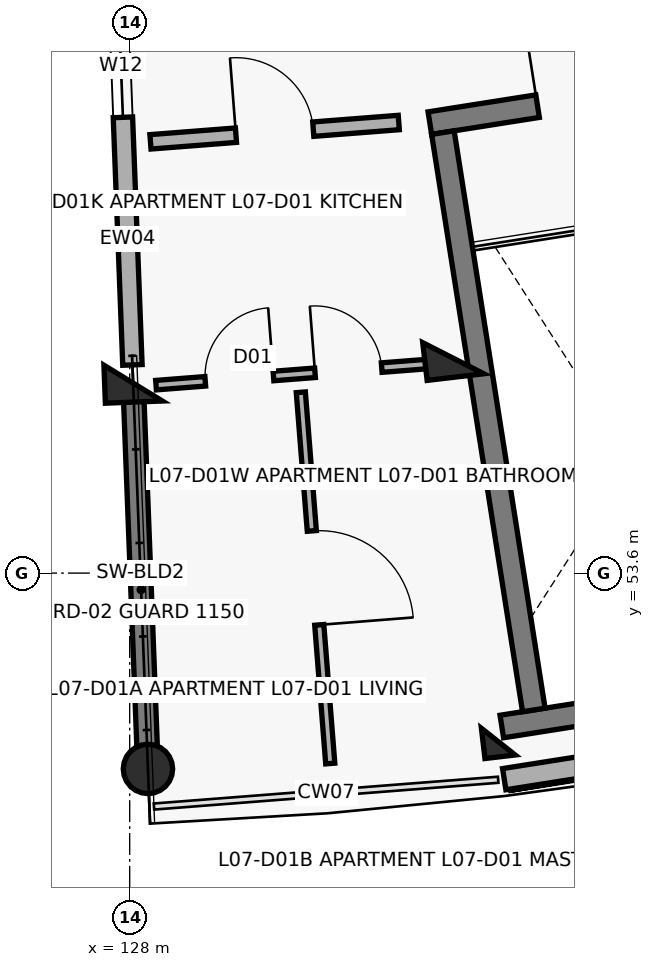
"""IFC4 building model, lengths in metres.
Left out: names, types, materials, properties, quantities, classifications, styles, units other than length and angle.
Written with IfcOpenShell. Run it as: python <this file> out.ifc"""

import sys

from ifc_helpers import new_model, si_unit, direction, frame, frame_2d, origin, origin_2d, place, context, subcontext, project, spatial, rectangle, circle, extrude, element, fill, save


model = new_model("IFC4")
c1 = context("Model", 3, precision=1e-05, world=origin(), true_north=direction((0.0, 1.0)))
c2 = subcontext(c1, "Body", "Model", "MODEL_VIEW")
j1 = project(units=[si_unit("LENGTHUNIT", "METRE"), si_unit("PLANEANGLEUNIT", "RADIAN")], contexts=[c1])
p1 = place(None, origin())
s1 = spatial("IfcSite", under=j1, at=p1, CompositionType="ELEMENT")
p2 = place(p1, origin())
s2 = spatial("IfcBuilding", under=s1, at=p2, CompositionType="ELEMENT")
p3 = place(p2, frame((0.0, 0.0, 23.6)))
s3 = spatial("IfcBuildingStorey", under=s2, at=p3, CompositionType="ELEMENT", Elevation=23.6)
p4 = place(p3, frame((128.045, 56.1, 0.0), z_axis=(0.0, 0.0, 1.0), x_axis=(0.038387809088, -0.999262916411, 0.0)))
e1 = element("IfcColumn", 1, at=p4, inside=s3, PredefinedType="COLUMN", context=c2, shape_type="SweptSolid", body=[
    extrude(rectangle(XDim=0.5, YDim=0.75, at=origin_2d()), origin(), (0.0, 0.0, 1.0), 3.1),
])
p5 = place(p3, frame((128.24, 51.023, 0.0), z_axis=(0.0, 0.0, 1.0), x_axis=(0.038387809088, -0.999262916411, 0.0)))
e2 = element("IfcColumn", 2, at=p5, inside=s3, PredefinedType="COLUMN", context=c2, shape_type="SweptSolid", body=[
    extrude(circle(Radius=0.325, at=origin_2d()), origin(), (0.0, 0.0, 1.0), 3.1),
])
p6 = place(p3, frame((132.257, 56.427, 0.0), z_axis=(0.0, 0.0, 1.0), x_axis=(0.116670737099, -0.993170649538, 0.0)))
e3 = element("IfcColumn", 3, at=p6, inside=s3, PredefinedType="COLUMN", context=c2, shape_type="SweptSolid", body=[
    extrude(rectangle(XDim=0.5, YDim=0.75, at=origin_2d()), origin(), (0.0, 0.0, 1.0), 3.1),
])
p7 = place(p3, frame((132.85, 51.382, 0.0), z_axis=(0.0, 0.0, 1.0), x_axis=(0.116670737099, -0.993170649538, 0.0)))
e4 = element("IfcColumn", 4, at=p7, inside=s3, PredefinedType="COLUMN", context=c2, shape_type="SweptSolid", body=[
    extrude(rectangle(XDim=0.4, YDim=0.4, at=origin_2d()), origin(), (0.0, 0.0, 1.0), 3.1),
])
p8 = place(p3, frame((128.052, 55.92, 0.0), z_axis=(0.0, 0.0, 1.0), x_axis=(0.038381471406, -0.99926315986, 0.0)))
e5 = element("IfcWall", 5, at=p8, inside=s3, PredefinedType="SHEAR", context=c2, shape_type="SweptSolid", body=[
    extrude(rectangle(XDim=4.72, YDim=0.27, at=frame_2d((2.36, 0.0))), origin(), (0.0, 0.0, 1.0), 2.92),
])
p9 = place(p3, frame((132.928, 50.889, 0.0), z_axis=(0.0, 0.0, 1.0), x_axis=(0.987828826394, 0.155544880165, 0.0)))
e6 = element("IfcWall", 6, at=p9, inside=s3, PredefinedType="SOLIDWALL", context=c2, shape_type="SweptSolid", body=[
    extrude(rectangle(XDim=4.622, YDim=0.282, at=frame_2d((2.311, 0.0))), origin(), (0.0, 0.0, 1.0), 2.25),
])
p10 = place(p3, frame((127.829, 61.736, 0.0), z_axis=(0.0, 0.0, 1.0), x_axis=(0.038384504742, -0.999263043345, 0.0)))
e7 = element("IfcWall", 7, at=p10, inside=s3, PredefinedType="SOLIDWALL", context=c2, shape_type="SweptSolid", body=[
    extrude(rectangle(XDim=5.4, YDim=0.255, at=frame_2d((2.7, 0.0))), origin(), (0.0, 0.0, 1.0), 2.24),
])
p11 = place(p10, frame((0.79, 0.0, 0.75)))
e8 = element("IfcOpeningElement", 8, at=p11, cuts=e7, PredefinedType="OPENING", context=c2, shape_type="SweptSolid", body=[
    extrude(rectangle(XDim=1.35, YDim=1.35, at=frame_2d((0.675, 0.675))), frame((0.0, 0.137, 0.0), z_axis=(0.0, -1.0, 0.0), x_axis=(1.0, 0.0, 0.0)), (0.0, 0.0, 1.0), 0.275),
])
p12 = place(p3, frame((131.949, 59.521, 0.0), z_axis=(0.0, 0.0, 1.0), x_axis=(0.98782579805, 0.155564111245, 0.0)))
e9 = element("IfcWall", 9, at=p12, inside=s3, PredefinedType="SHEAR", context=c2, shape_type="SweptSolid", body=[
    extrude(rectangle(XDim=3.87, YDim=0.3, at=frame_2d((1.935, 0.0))), origin(), (0.0, 0.0, 1.0), 3.1),
])
p13 = place(p12, frame((1.435, 0.0, 0.0)))
e10 = element("IfcOpeningElement", 10, at=p13, cuts=e9, PredefinedType="OPENING", context=c2, shape_type="SweptSolid", body=[
    extrude(rectangle(XDim=1.0, YDim=2.15, at=frame_2d((0.5, 1.075))), frame((0.0, 0.16, 0.0), z_axis=(0.0, -1.0, 0.0), x_axis=(1.0, 0.0, 0.0)), (0.0, 0.0, 1.0), 0.32),
])
p14 = place(p3, frame((132.896, 51.581, 0.0), z_axis=(0.0, 0.0, 1.0), x_axis=(0.987819142769, 0.155606366126, 0.0)))
e11 = element("IfcWall", 11, at=p14, inside=s3, PredefinedType="SHEAR", context=c2, shape_type="SweptSolid", body=[
    extrude(rectangle(XDim=4.47, YDim=0.3, at=frame_2d((2.235, 0.0))), origin(), (0.0, 0.0, 1.0), 3.1),
])
p15 = place(p3, frame((132.121, 59.396, 0.0), z_axis=(0.0, 0.0, 1.0), x_axis=(0.155563141844, -0.987825950712, 0.0)))
e12 = element("IfcWall", 12, at=p15, inside=s3, PredefinedType="SHEAR", context=c2, shape_type="SweptSolid", body=[
    extrude(rectangle(XDim=7.69, YDim=0.3, at=frame_2d((3.845, 0.0))), origin(), (0.0, 0.0, 1.0), 3.1),
])
p16 = place(p3, frame((128.273, 59.274, 0.0), z_axis=(0.0, 0.0, 1.0), x_axis=(0.996982624396, 0.077625038827, 0.0)))
e13 = element("IfcWall", 13, at=p16, inside=s3, PredefinedType="SOLIDWALL", context=c2, shape_type="SweptSolid", body=[
    extrude(rectangle(XDim=3.277, YDim=0.19, at=frame_2d((1.639, 0.0))), origin(), (0.0, 0.0, 1.0), 2.14),
])
p17 = place(p16, frame((1.128, 0.0, 0.0)))
e14 = element("IfcOpeningElement", 14, at=p17, cuts=e13, PredefinedType="OPENING", context=c2, shape_type="SweptSolid", body=[
    extrude(rectangle(XDim=1.02, YDim=2.15, at=frame_2d((0.51, 1.075))), frame((0.0, 0.105, 0.0), z_axis=(0.0, -1.0, 0.0), x_axis=(1.0, 0.0, 0.0)), (0.0, 0.0, 1.0), 0.21),
])
p18 = place(p3, frame((128.346, 56.073, 0.0), z_axis=(0.0, 0.0, 1.0), x_axis=(0.996986014478, 0.077581485773, 0.0)))
e15 = element("IfcWall", 15, at=p18, inside=s3, PredefinedType="PARTITIONING", context=c2, shape_type="SweptSolid", body=[
    extrude(rectangle(XDim=3.628, YDim=0.125, at=frame_2d((1.814, 0.0))), origin(), (0.0, 0.0, 1.0), 2.14),
])
p19 = place(p18, frame((0.65, 0.0, 0.0)))
e16 = element("IfcOpeningElement", 16, at=p19, cuts=e15, PredefinedType="OPENING", context=c2, shape_type="SweptSolid", body=[
    extrude(rectangle(XDim=0.9, YDim=2.1, at=frame_2d((0.45, 1.05))), frame((0.0, 0.073, 0.0), z_axis=(0.0, -1.0, 0.0), x_axis=(1.0, 0.0, 0.0)), (0.0, 0.0, 1.0), 0.145),
])
p20 = place(p18, frame((2.098, 0.0, 0.0)))
e17 = element("IfcOpeningElement", 17, at=p20, cuts=e15, PredefinedType="OPENING", context=c2, shape_type="SweptSolid", body=[
    extrude(rectangle(XDim=0.88, YDim=2.1, at=frame_2d((0.44, 1.05))), frame((0.0, 0.073, 0.0), z_axis=(0.0, -1.0, 0.0), x_axis=(1.0, 0.0, 0.0)), (0.0, 0.0, 1.0), 0.145),
])
p21 = place(p3, frame((130.251, 55.979, 0.0), z_axis=(0.0, 0.0, 1.0), x_axis=(0.079073860253, -0.99686875998, 0.0)))
e18 = element("IfcWall", 18, at=p21, inside=s3, PredefinedType="PARTITIONING", context=c2, shape_type="SweptSolid", body=[
    extrude(rectangle(XDim=4.9, YDim=0.12, at=frame_2d((2.45, 0.0))), origin(), (0.0, 0.0, 1.0), 2.14),
])
p22 = place(p21, frame((1.83, 0.0, 0.0)))
e19 = element("IfcOpeningElement", 19, at=p22, cuts=e18, PredefinedType="OPENING", context=c2, shape_type="SweptSolid", body=[
    extrude(rectangle(XDim=1.24, YDim=2.1, at=frame_2d((0.62, 1.05))), frame((0.0, 0.07, 0.0), z_axis=(0.0, -1.0, 0.0), x_axis=(1.0, 0.0, 0.0)), (0.0, 0.0, 1.0), 0.14),
])
p23 = place(p11, origin())
e20 = element("IfcWindow", 20, at=p23, inside=s3, PartitioningType="DOUBLE_PANEL_VERTICAL", PredefinedType="WINDOW", context=c2, shape_type="SweptSolid", body=[
    extrude(rectangle(XDim=1.35, YDim=1.35, at=frame_2d((0.675, 0.675))), frame((0.0, 0.03, 0.0), z_axis=(0.0, -1.0, 0.0), x_axis=(1.0, 0.0, 0.0)), (0.0, 0.0, 1.0), 0.06),
])
fill(e8, e20)
p24 = place(p13, origin())
e21 = element("IfcDoor", 21, at=p24, inside=s3, OperationType="SINGLE_SWING_LEFT", PredefinedType="DOOR", context=c2, shape_type="SweptSolid", body=[
    extrude(rectangle(XDim=1.0, YDim=2.15, at=frame_2d((0.5, 1.075))), frame((0.0, 0.025, 0.0), z_axis=(0.0, -1.0, 0.0), x_axis=(1.0, 0.0, 0.0)), (0.0, 0.0, 1.0), 0.05),
])
fill(e10, e21)
p25 = place(p17, origin())
e22 = element("IfcDoor", 22, at=p25, inside=s3, OperationType="SINGLE_SWING_LEFT", PredefinedType="DOOR", context=c2, shape_type="SweptSolid", body=[
    extrude(rectangle(XDim=1.02, YDim=2.15, at=frame_2d((0.51, 1.075))), frame((0.0, 0.025, 0.0), z_axis=(0.0, -1.0, 0.0), x_axis=(1.0, 0.0, 0.0)), (0.0, 0.0, 1.0), 0.05),
])
fill(e14, e22)
p26 = place(p19, origin())
e23 = element("IfcDoor", 23, at=p26, inside=s3, OperationType="SINGLE_SWING_RIGHT", PredefinedType="DOOR", context=c2, shape_type="SweptSolid", body=[
    extrude(rectangle(XDim=0.9, YDim=2.1, at=frame_2d((0.45, 1.05))), frame((0.0, 0.025, 0.0), z_axis=(0.0, -1.0, 0.0), x_axis=(1.0, 0.0, 0.0)), (0.0, 0.0, 1.0), 0.05),
])
fill(e16, e23)
p27 = place(p20, origin())
e24 = element("IfcDoor", 24, at=p27, inside=s3, OperationType="SINGLE_SWING_LEFT", PredefinedType="DOOR", context=c2, shape_type="SweptSolid", body=[
    extrude(rectangle(XDim=0.88, YDim=2.1, at=frame_2d((0.44, 1.05))), frame((0.0, 0.025, 0.0), z_axis=(0.0, -1.0, 0.0), x_axis=(1.0, 0.0, 0.0)), (0.0, 0.0, 1.0), 0.05),
])
fill(e17, e24)
p28 = place(p22, origin())
e25 = element("IfcDoor", 25, at=p28, inside=s3, OperationType="SINGLE_SWING_RIGHT", PredefinedType="DOOR", context=c2, shape_type="SweptSolid", body=[
    extrude(rectangle(XDim=1.24, YDim=2.1, at=frame_2d((0.62, 1.05))), frame((0.0, 0.025, 0.0), z_axis=(0.0, -1.0, 0.0), x_axis=(1.0, 0.0, 0.0)), (0.0, 0.0, 1.0), 0.05),
])
fill(e19, e25)
save(model, sys.argv[1])
